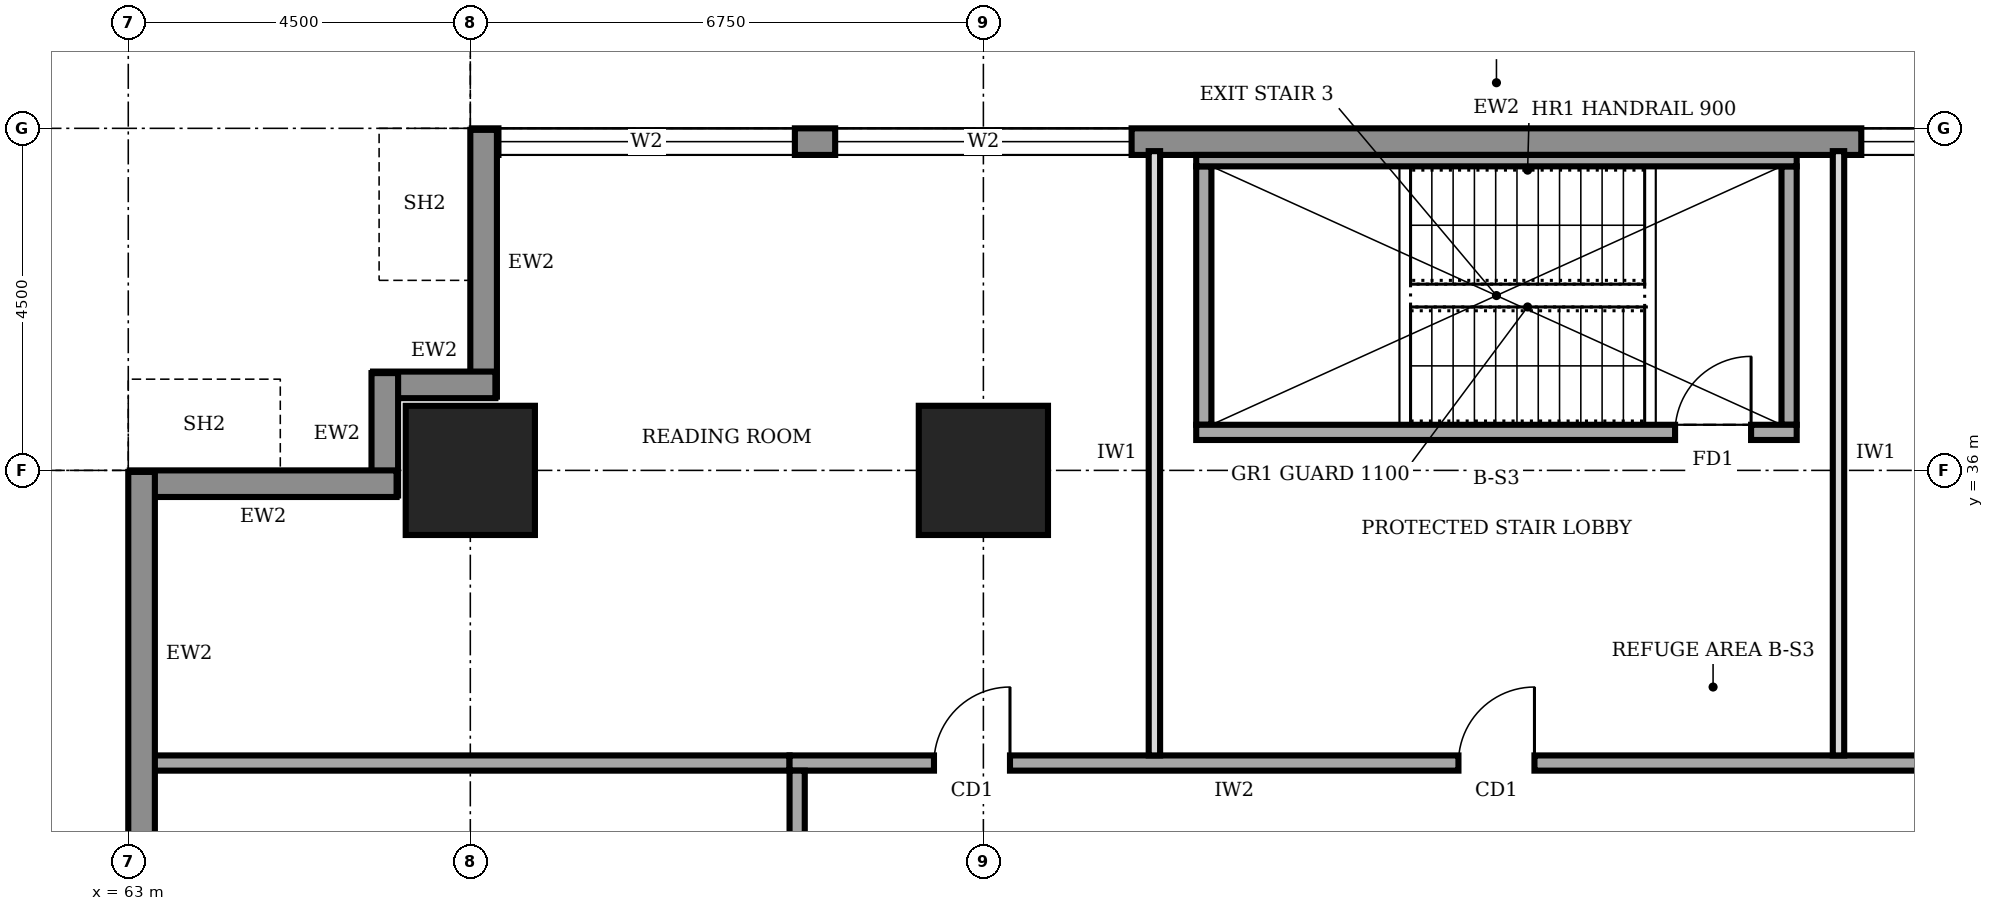
"""IFC4 building model, lengths in metres.
Left out: names, types, materials, properties, quantities, classifications, styles, units other than length and angle.
Written with IfcOpenShell. Run it as: python <this file> out.ifc"""

import sys

from ifc_helpers import new_model, si_unit, direction, frame, frame_2d, origin, origin_2d, place, context, subcontext, project, spatial, rectangle, extrude, element, fill, save


model = new_model("IFC4")
c1 = context("Model", 3, precision=1e-05, world=origin(), true_north=direction((0.0, 1.0)))
c2 = subcontext(c1, "Body", "Model", "MODEL_VIEW")
j1 = project(units=[si_unit("LENGTHUNIT", "METRE"), si_unit("PLANEANGLEUNIT", "RADIAN")], contexts=[c1])
p1 = place(None, origin())
s1 = spatial("IfcSite", under=j1, at=p1, CompositionType="ELEMENT")
p2 = place(p1, origin())
s2 = spatial("IfcBuilding", under=s1, at=p2, CompositionType="ELEMENT")
p3 = place(p2, frame((0.0, 0.0, 49.0)))
s3 = spatial("IfcBuildingStorey", under=s2, at=p3, CompositionType="ELEMENT", Elevation=49.0)
for number, where, z_axis, x_axis in (
    (1, (67.5, 36.0, 0.0), (0.0, 0.0, 1.0), (1.0, 0.0, 0.0)),
    (2, (74.25, 36.0, 0.0), (0.0, 0.0, 1.0), (1.0, 0.0, 0.0)),
):
    element("IfcColumn", number, at=place(p3, frame(where, z_axis=z_axis, x_axis=x_axis)), inside=s3, PredefinedType="COLUMN", context=c2, shape_type="SweptSolid", body=[
        extrude(rectangle(XDim=1.7, YDim=1.7, at=origin_2d()), origin(), (0.0, 0.0, 1.0), 4.0),
    ])
p4 = place(p3, frame((94.48, 40.325, 0.0), z_axis=(0.0, 0.0, 1.0), x_axis=(-1.0, 0.0, 0.0)))
e3 = element("IfcWall", 3, at=p4, inside=s3, PredefinedType="STANDARD", context=c2, shape_type="SweptSolid", body=[
    extrude(rectangle(XDim=26.96, YDim=0.35, at=frame_2d((13.48, 0.0))), origin(), (0.0, 0.0, 1.0), 3.75),
])
p5 = place(p4, frame((22.71, 0.0, 0.6)))
e4 = element("IfcOpeningElement", 4, at=p5, cuts=e3, PredefinedType="OPENING", context=c2, shape_type="SweptSolid", body=[
    extrude(rectangle(XDim=3.9, YDim=2.6, at=frame_2d((1.95, 1.3))), frame((0.0, 0.185, 0.0), z_axis=(0.0, -1.0, 0.0), x_axis=(1.0, 0.0, 0.0)), (0.0, 0.0, 1.0), 0.37),
])
p6 = place(p4, frame((18.28, 0.0, 0.6)))
e5 = element("IfcOpeningElement", 5, at=p6, cuts=e3, PredefinedType="OPENING", context=c2, shape_type="SweptSolid", body=[
    extrude(rectangle(XDim=3.9, YDim=2.6, at=frame_2d((1.95, 1.3))), frame((0.0, 0.185, 0.0), z_axis=(0.0, -1.0, 0.0), x_axis=(1.0, 0.0, 0.0)), (0.0, 0.0, 1.0), 0.37),
])
p7 = place(p4, frame((4.78, 0.0, 0.6)))
e6 = element("IfcOpeningElement", 6, at=p7, cuts=e3, PredefinedType="OPENING", context=c2, shape_type="SweptSolid", body=[
    extrude(rectangle(XDim=3.9, YDim=2.6, at=frame_2d((1.95, 1.3))), frame((0.0, 0.185, 0.0), z_axis=(0.0, -1.0, 0.0), x_axis=(1.0, 0.0, 0.0)), (0.0, 0.0, 1.0), 0.37),
])
p8 = place(p3, frame((67.675, 40.48, 0.0), z_axis=(0.0, 0.0, 1.0), x_axis=(0.0, -1.0, 0.0)))
e7 = element("IfcWall", 7, at=p8, inside=s3, PredefinedType="STANDARD", context=c2, shape_type="SweptSolid", body=[
    extrude(rectangle(XDim=3.51, YDim=0.35, at=frame_2d((1.755, 0.0))), origin(), (0.0, 0.0, 1.0), 2.85),
])
for number, where, z_axis, x_axis in (
    (8, (67.83, 37.125, 0.0), (0.0, 0.0, 1.0), (-1.0, 0.0, 0.0)),
    (9, (66.375, 37.28, 0.0), (0.0, 0.0, 1.0), (0.0, -1.0, 0.0)),
):
    element("IfcWall", number, at=place(p3, frame(where, z_axis=z_axis, x_axis=x_axis)), inside=s3, PredefinedType="STANDARD", context=c2, shape_type="SweptSolid", body=[
        extrude(rectangle(XDim=1.61, YDim=0.35, at=frame_2d((0.805, 0.0))), origin(), (0.0, 0.0, 1.0), 3.75),
    ])
p9 = place(p3, frame((66.53, 35.825, 0.0), z_axis=(0.0, 0.0, 1.0), x_axis=(-1.0, 0.0, 0.0)))
e10 = element("IfcWall", 10, at=p9, inside=s3, PredefinedType="STANDARD", context=c2, shape_type="SweptSolid", body=[
    extrude(rectangle(XDim=3.51, YDim=0.35, at=frame_2d((1.755, 0.0))), origin(), (0.0, 0.0, 1.0), 2.85),
])
p10 = place(p3, frame((63.175, 35.98, 0.0), z_axis=(0.0, 0.0, 1.0), x_axis=(0.0, -1.0, 0.0)))
e11 = element("IfcWall", 11, at=p10, inside=s3, PredefinedType="STANDARD", context=c2, shape_type="SweptSolid", body=[
    extrude(rectangle(XDim=31.46, YDim=0.35, at=frame_2d((15.73, 0.0))), origin(), (0.0, 0.0, 1.0), 3.75),
])
p11 = place(p10, frame((27.21, 0.0, 0.6)))
e12 = element("IfcOpeningElement", 12, at=p11, cuts=e11, PredefinedType="OPENING", context=c2, shape_type="SweptSolid", body=[
    extrude(rectangle(XDim=3.9, YDim=2.6, at=frame_2d((1.95, 1.3))), frame((0.0, 0.185, 0.0), z_axis=(0.0, -1.0, 0.0), x_axis=(1.0, 0.0, 0.0)), (0.0, 0.0, 1.0), 0.37),
])
p12 = place(p10, frame((22.78, 0.0, 0.6)))
e13 = element("IfcOpeningElement", 13, at=p12, cuts=e11, PredefinedType="OPENING", context=c2, shape_type="SweptSolid", body=[
    extrude(rectangle(XDim=3.9, YDim=2.6, at=frame_2d((1.95, 1.3))), frame((0.0, 0.185, 0.0), z_axis=(0.0, -1.0, 0.0), x_axis=(1.0, 0.0, 0.0)), (0.0, 0.0, 1.0), 0.37),
])
p13 = place(p10, frame((18.28, 0.0, 0.6)))
e14 = element("IfcOpeningElement", 14, at=p13, cuts=e11, PredefinedType="OPENING", context=c2, shape_type="SweptSolid", body=[
    extrude(rectangle(XDim=3.9, YDim=2.6, at=frame_2d((1.95, 1.3))), frame((0.0, 0.185, 0.0), z_axis=(0.0, -1.0, 0.0), x_axis=(1.0, 0.0, 0.0)), (0.0, 0.0, 1.0), 0.37),
])
p14 = place(p10, frame((13.78, 0.0, 0.6)))
e15 = element("IfcOpeningElement", 15, at=p14, cuts=e11, PredefinedType="OPENING", context=c2, shape_type="SweptSolid", body=[
    extrude(rectangle(XDim=3.9, YDim=2.6, at=frame_2d((1.95, 1.3))), frame((0.0, 0.185, 0.0), z_axis=(0.0, -1.0, 0.0), x_axis=(1.0, 0.0, 0.0)), (0.0, 0.0, 1.0), 0.37),
])
p15 = place(p10, frame((9.28, 0.0, 0.6)))
e16 = element("IfcOpeningElement", 16, at=p15, cuts=e11, PredefinedType="OPENING", context=c2, shape_type="SweptSolid", body=[
    extrude(rectangle(XDim=3.9, YDim=2.6, at=frame_2d((1.95, 1.3))), frame((0.0, 0.185, 0.0), z_axis=(0.0, -1.0, 0.0), x_axis=(1.0, 0.0, 0.0)), (0.0, 0.0, 1.0), 0.37),
])
p16 = place(p10, frame((4.78, 0.0, 0.6)))
e17 = element("IfcOpeningElement", 17, at=p16, cuts=e11, PredefinedType="OPENING", context=c2, shape_type="SweptSolid", body=[
    extrude(rectangle(XDim=3.9, YDim=2.6, at=frame_2d((1.95, 1.3))), frame((0.0, 0.185, 0.0), z_axis=(0.0, -1.0, 0.0), x_axis=(1.0, 0.0, 0.0)), (0.0, 0.0, 1.0), 0.37),
])
p17 = place(p3, frame((89.35, 32.15, 0.0), z_axis=(0.0, 0.0, 1.0), x_axis=(-1.0, 0.0, 0.0)))
e18 = element("IfcWall", 18, at=p17, inside=s3, PredefinedType="SOLIDWALL", context=c2, shape_type="SweptSolid", body=[
    extrude(rectangle(XDim=17.65, YDim=0.2, at=frame_2d((8.825, 0.0))), origin(), (0.0, 0.0, 1.0), 3.75),
])
p18 = place(p17, frame((14.75, 0.0, 0.0)))
e19 = element("IfcOpeningElement", 19, at=p18, cuts=e18, PredefinedType="OPENING", context=c2, shape_type="SweptSolid", body=[
    extrude(rectangle(XDim=1.0, YDim=2.1, at=frame_2d((0.5, 1.05))), frame((0.0, 0.11, 0.0), z_axis=(0.0, -1.0, 0.0), x_axis=(1.0, 0.0, 0.0)), (0.0, 0.0, 1.0), 0.22),
])
p19 = place(p17, frame((7.85, 0.0, 0.0)))
e20 = element("IfcOpeningElement", 20, at=p19, cuts=e18, PredefinedType="OPENING", context=c2, shape_type="SweptSolid", body=[
    extrude(rectangle(XDim=1.0, YDim=2.1, at=frame_2d((0.5, 1.05))), frame((0.0, 0.11, 0.0), z_axis=(0.0, -1.0, 0.0), x_axis=(1.0, 0.0, 0.0)), (0.0, 0.0, 1.0), 0.22),
])
p20 = place(p17, frame((1.325, 0.0, 0.0)))
e21 = element("IfcOpeningElement", 21, at=p20, cuts=e18, PredefinedType="OPENING", context=c2, shape_type="SweptSolid", body=[
    extrude(rectangle(XDim=1.0, YDim=2.1, at=frame_2d((0.5, 1.05))), frame((0.0, 0.11, 0.0), z_axis=(0.0, -1.0, 0.0), x_axis=(1.0, 0.0, 0.0)), (0.0, 0.0, 1.0), 0.22),
])
p21 = place(p3, frame((71.8, 32.05, 0.0), z_axis=(0.0, 0.0, 1.0), x_axis=(0.0, -1.0, 0.0)))
e22 = element("IfcWall", 22, at=p21, inside=s3, PredefinedType="SOLIDWALL", context=c2, shape_type="SweptSolid", body=[
    extrude(rectangle(XDim=23.05, YDim=0.2, at=frame_2d((11.525, 0.0))), origin(), (0.0, 0.0, 1.0), 3.75),
])
p22 = place(p21, frame((18.05, 0.0, 0.0)))
e23 = element("IfcOpeningElement", 23, at=p22, cuts=e22, PredefinedType="OPENING", context=c2, shape_type="SweptSolid", body=[
    extrude(rectangle(XDim=1.0, YDim=2.1, at=frame_2d((0.5, 1.05))), frame((0.0, 0.11, 0.0), z_axis=(0.0, -1.0, 0.0), x_axis=(1.0, 0.0, 0.0)), (0.0, 0.0, 1.0), 0.22),
])
p23 = place(p21, frame((11.3, 0.0, 0.0)))
e24 = element("IfcOpeningElement", 24, at=p23, cuts=e22, PredefinedType="OPENING", context=c2, shape_type="SweptSolid", body=[
    extrude(rectangle(XDim=1.0, YDim=2.1, at=frame_2d((0.5, 1.05))), frame((0.0, 0.11, 0.0), z_axis=(0.0, -1.0, 0.0), x_axis=(1.0, 0.0, 0.0)), (0.0, 0.0, 1.0), 0.22),
])
p24 = place(p21, frame((4.175, 0.0, 0.0)))
e25 = element("IfcOpeningElement", 25, at=p24, cuts=e22, PredefinedType="OPENING", context=c2, shape_type="SweptSolid", body=[
    extrude(rectangle(XDim=1.0, YDim=2.1, at=frame_2d((0.5, 1.05))), frame((0.0, 0.11, 0.0), z_axis=(0.0, -1.0, 0.0), x_axis=(1.0, 0.0, 0.0)), (0.0, 0.0, 1.0), 0.22),
])
p25 = place(p3, frame((63.3, 32.15, 0.0), z_axis=(0.0, 0.0, 1.0), x_axis=(1.0, 0.0, 0.0)))
e26 = element("IfcWall", 26, at=p25, inside=s3, PredefinedType="SOLIDWALL", context=c2, shape_type="SweptSolid", body=[
    extrude(rectangle(XDim=8.4, YDim=0.2, at=frame_2d((4.2, 0.0))), origin(), (0.0, 0.0, 1.0), 3.75),
])
for number, where, z_axis, x_axis in (
    (27, (76.5, 32.25, 0.0), (0.0, 0.0, 1.0), (0.0, 1.0, 0.0)),
    (28, (85.5, 32.25, 0.0), (0.0, 0.0, 1.0), (0.0, 1.0, 0.0)),
):
    element("IfcWall", number, at=place(p3, frame(where, z_axis=z_axis, x_axis=x_axis)), inside=s3, PredefinedType="PARTITIONING", context=c2, shape_type="SweptSolid", body=[
        extrude(rectangle(XDim=7.95, YDim=0.15, at=frame_2d((3.975, 0.0))), origin(), (0.0, 0.0, 1.0), 3.75),
    ])
p26 = place(p3, frame((77.05, 36.5, 0.0), z_axis=(0.0, 0.0, 1.0), x_axis=(1.0, 0.0, 0.0)))
e29 = element("IfcWall", 29, at=p26, inside=s3, PredefinedType="SOLIDWALL", context=c2, shape_type="SweptSolid", body=[
    extrude(rectangle(XDim=7.9, YDim=0.2, at=frame_2d((3.95, 0.0))), origin(), (0.0, 0.0, 1.0), 3.75),
])
p27 = place(p26, frame((6.3, 0.0, 0.0)))
e30 = element("IfcOpeningElement", 30, at=p27, cuts=e29, PredefinedType="OPENING", context=c2, shape_type="SweptSolid", body=[
    extrude(rectangle(XDim=1.0, YDim=2.1, at=frame_2d((0.5, 1.05))), frame((0.0, 0.11, 0.0), z_axis=(0.0, -1.0, 0.0), x_axis=(1.0, 0.0, 0.0)), (0.0, 0.0, 1.0), 0.22),
])
p28 = place(p3, frame((77.05, 40.075, 0.0), z_axis=(0.0, 0.0, 1.0), x_axis=(1.0, 0.0, 0.0)))
e31 = element("IfcWall", 31, at=p28, inside=s3, PredefinedType="SOLIDWALL", context=c2, shape_type="SweptSolid", body=[
    extrude(rectangle(XDim=7.9, YDim=0.15, at=frame_2d((3.95, 0.0))), origin(), (0.0, 0.0, 1.0), 3.75),
])
for number, where, z_axis, x_axis in (
    (32, (77.15, 36.6, 0.0), (0.0, 0.0, 1.0), (0.0, 1.0, 0.0)),
    (33, (84.85, 36.6, 0.0), (0.0, 0.0, 1.0), (0.0, 1.0, 0.0)),
):
    element("IfcWall", number, at=place(p3, frame(where, z_axis=z_axis, x_axis=x_axis)), inside=s3, PredefinedType="SOLIDWALL", context=c2, shape_type="SweptSolid", body=[
        extrude(rectangle(XDim=3.4, YDim=0.2, at=frame_2d((1.7, 0.0))), origin(), (0.0, 0.0, 1.0), 3.75),
    ])
p29 = place(p5, origin())
e34 = element("IfcWindow", 34, at=p29, inside=s3, PartitioningType="SINGLE_PANEL", PredefinedType="WINDOW", context=c2, shape_type="SweptSolid", body=[
    extrude(rectangle(XDim=3.9, YDim=2.6, at=frame_2d((1.95, 1.3))), frame((0.0, 0.03, 0.0), z_axis=(0.0, -1.0, 0.0), x_axis=(1.0, 0.0, 0.0)), (0.0, 0.0, 1.0), 0.06),
])
fill(e4, e34)
p30 = place(p6, origin())
e35 = element("IfcWindow", 35, at=p30, inside=s3, PartitioningType="SINGLE_PANEL", PredefinedType="WINDOW", context=c2, shape_type="SweptSolid", body=[
    extrude(rectangle(XDim=3.9, YDim=2.6, at=frame_2d((1.95, 1.3))), frame((0.0, 0.03, 0.0), z_axis=(0.0, -1.0, 0.0), x_axis=(1.0, 0.0, 0.0)), (0.0, 0.0, 1.0), 0.06),
])
fill(e5, e35)
p31 = place(p7, origin())
e36 = element("IfcWindow", 36, at=p31, inside=s3, PartitioningType="SINGLE_PANEL", PredefinedType="WINDOW", context=c2, shape_type="SweptSolid", body=[
    extrude(rectangle(XDim=3.9, YDim=2.6, at=frame_2d((1.95, 1.3))), frame((0.0, 0.03, 0.0), z_axis=(0.0, -1.0, 0.0), x_axis=(1.0, 0.0, 0.0)), (0.0, 0.0, 1.0), 0.06),
])
fill(e6, e36)
p32 = place(p18, frame((1.0, 0.0, 0.0), z_axis=(0.0, 0.0, 1.0), x_axis=(-1.0, 0.0, 0.0)))
e37 = element("IfcDoor", 37, at=p32, inside=s3, OperationType="SINGLE_SWING_RIGHT", PredefinedType="DOOR", context=c2, shape_type="SweptSolid", body=[
    extrude(rectangle(XDim=1.0, YDim=2.1, at=frame_2d((0.5, 1.05))), frame((0.0, 0.025, 0.0), z_axis=(0.0, -1.0, 0.0), x_axis=(1.0, 0.0, 0.0)), (0.0, 0.0, 1.0), 0.05),
])
fill(e19, e37)
p33 = place(p19, frame((1.0, 0.0, 0.0), z_axis=(0.0, 0.0, 1.0), x_axis=(-1.0, 0.0, 0.0)))
e38 = element("IfcDoor", 38, at=p33, inside=s3, OperationType="SINGLE_SWING_RIGHT", PredefinedType="DOOR", context=c2, shape_type="SweptSolid", body=[
    extrude(rectangle(XDim=1.0, YDim=2.1, at=frame_2d((0.5, 1.05))), frame((0.0, 0.025, 0.0), z_axis=(0.0, -1.0, 0.0), x_axis=(1.0, 0.0, 0.0)), (0.0, 0.0, 1.0), 0.05),
])
fill(e20, e38)
p34 = place(p27, origin())
e39 = element("IfcDoor", 39, at=p34, inside=s3, OperationType="SINGLE_SWING_RIGHT", PredefinedType="DOOR", context=c2, shape_type="SweptSolid", body=[
    extrude(rectangle(XDim=1.0, YDim=2.1, at=frame_2d((0.5, 1.05))), frame((0.0, 0.025, 0.0), z_axis=(0.0, -1.0, 0.0), x_axis=(1.0, 0.0, 0.0)), (0.0, 0.0, 1.0), 0.05),
])
fill(e30, e39)
save(model, sys.argv[1])
